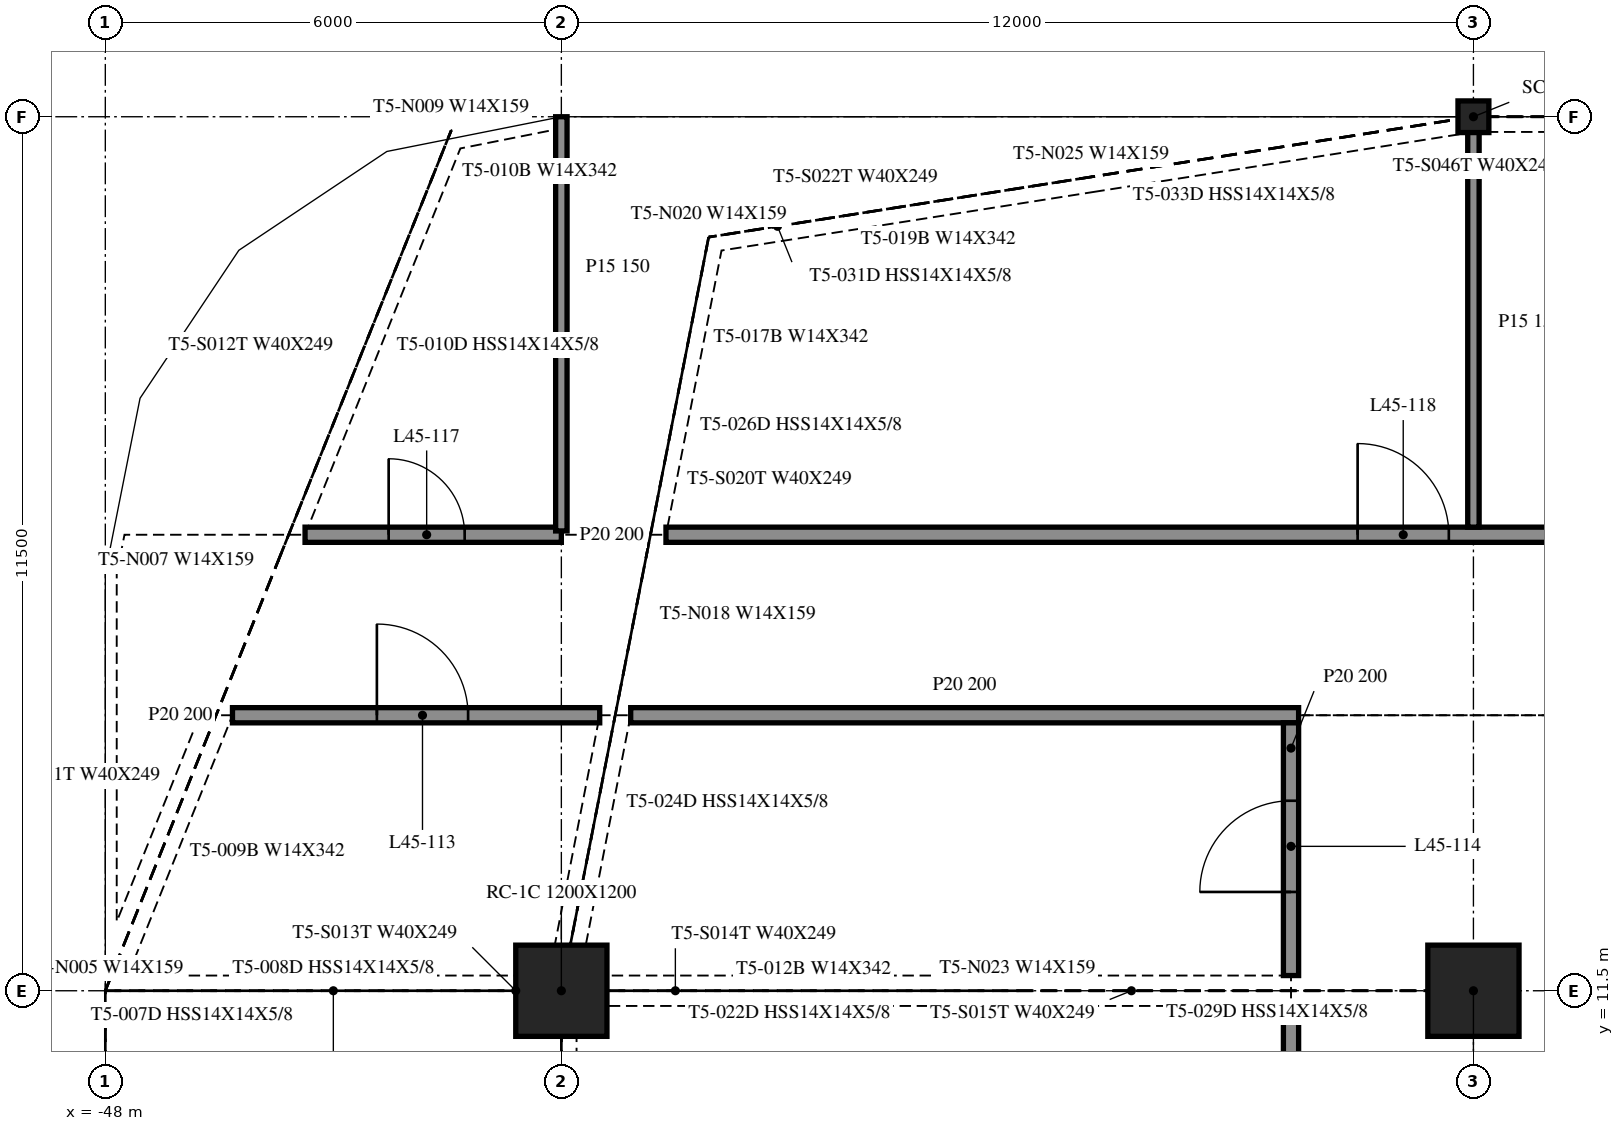
"""IFC4 building model, lengths in metres.
Left out: names, types, materials, properties, quantities, classifications, styles, units other than length and angle.
Written with IfcOpenShell. Run it as: python <this file> out.ifc"""

import sys

from ifc_helpers import new_model, si_unit, direction, frame, frame_2d, origin, origin_2d, place, context, subcontext, project, spatial, rectangle, i_section, extrude, element, fill, save


model = new_model("IFC4")
c1 = context("Model", 3, precision=1e-05, world=origin(), true_north=direction((0.0, 1.0)))
c2 = subcontext(c1, "Body", "Model", "MODEL_VIEW")
j1 = project(units=[si_unit("LENGTHUNIT", "METRE"), si_unit("PLANEANGLEUNIT", "RADIAN")], contexts=[c1])
p1 = place(None, origin())
s1 = spatial("IfcSite", under=j1, at=p1, CompositionType="ELEMENT")
p2 = place(p1, origin())
s2 = spatial("IfcBuilding", under=s1, at=p2, CompositionType="ELEMENT")
p3 = place(p2, frame((0.0, 0.0, 189.6)))
s3 = spatial("IfcBuildingStorey", under=s2, at=p3, CompositionType="ELEMENT", Elevation=189.6)
for number, where, z_axis, x_axis in (
    (1, (-42.0, 11.5, -0.4), (0.0, 0.0, 1.0), (1.0, 0.0, 0.0)),
    (2, (-30.0, 11.5, -0.4), (0.0, 0.0, 1.0), (1.0, 0.0, 0.0)),
):
    element("IfcColumn", number, at=place(p3, frame(where, z_axis=z_axis, x_axis=x_axis)), inside=s3, PredefinedType="COLUMN", context=c2, shape_type="SweptSolid", body=[
        extrude(rectangle(XDim=1.2, YDim=1.2, at=origin_2d()), origin(), (0.0, 0.0, 1.0), 4.36),
    ])
p4 = place(p3, frame((-30.0, 23.0, -0.4), z_axis=(0.0, 0.0, 1.0), x_axis=(1.0, 0.0, 0.0)))
e3 = element("IfcColumn", 3, at=p4, inside=s3, PredefinedType="COLUMN", context=c2, shape_type="SweptSolid", body=[
    extrude(i_section(OverallWidth=0.406, OverallDepth=0.417, WebThickness=0.03, FlangeThickness=0.048, at=origin_2d()), origin(), (0.0, 0.0, 1.0), 4.36),
])
p5 = place(p3, frame((-46.327, 15.125, 0.0), z_axis=(0.0, 0.0, 1.0), x_axis=(1.0, 0.0, 0.0)))
e4 = element("IfcWall", 4, at=p5, inside=s3, PredefinedType="PARTITIONING", context=c2, shape_type="SweptSolid", body=[
    extrude(rectangle(XDim=4.832, YDim=0.2, at=frame_2d((2.416, 0.0))), origin(), (0.0, 0.0, 1.0), 3.96),
])
p6 = place(p5, frame((1.9, 0.0, 0.0)))
e5 = element("IfcOpeningElement", 5, at=p6, cuts=e4, PredefinedType="OPENING", context=c2, shape_type="SweptSolid", body=[
    extrude(rectangle(XDim=1.2, YDim=2.1, at=frame_2d((0.6, 1.05))), frame((0.0, 0.11, 0.0), z_axis=(0.0, -1.0, 0.0), x_axis=(1.0, 0.0, 0.0)), (0.0, 0.0, 1.0), 0.22),
])
p7 = place(p3, frame((-41.088, 15.125, 0.0), z_axis=(0.0, 0.0, 1.0), x_axis=(1.0, 0.0, 0.0)))
e6 = element("IfcWall", 6, at=p7, inside=s3, PredefinedType="PARTITIONING", context=c2, shape_type="SweptSolid", body=[
    extrude(rectangle(XDim=8.788, YDim=0.2, at=frame_2d((4.394, 0.0))), origin(), (0.0, 0.0, 1.0), 3.96),
])
p8 = place(p3, frame((-45.372, 17.5, 0.0), z_axis=(0.0, 0.0, 1.0), x_axis=(1.0, 0.0, 0.0)))
e7 = element("IfcWall", 7, at=p8, inside=s3, PredefinedType="PARTITIONING", context=c2, shape_type="SweptSolid", body=[
    extrude(rectangle(XDim=3.372, YDim=0.2, at=frame_2d((1.686, 0.0))), origin(), (0.0, 0.0, 1.0), 3.96),
])
p9 = place(p8, frame((1.1, 0.0, 0.0)))
e8 = element("IfcOpeningElement", 8, at=p9, cuts=e7, PredefinedType="OPENING", context=c2, shape_type="SweptSolid", body=[
    extrude(rectangle(XDim=1.0, YDim=2.1, at=frame_2d((0.5, 1.05))), frame((0.0, 0.11, 0.0), z_axis=(0.0, -1.0, 0.0), x_axis=(1.0, 0.0, 0.0)), (0.0, 0.0, 1.0), 0.22),
])
p10 = place(p3, frame((-40.624, 17.5, 0.0), z_axis=(0.0, 0.0, 1.0), x_axis=(1.0, 0.0, 0.0)))
e9 = element("IfcWall", 9, at=p10, inside=s3, PredefinedType="PARTITIONING", context=c2, shape_type="SweptSolid", body=[
    extrude(rectangle(XDim=94.524, YDim=0.2, at=frame_2d((47.262, 0.0))), origin(), (0.0, 0.0, 1.0), 3.96),
])
p11 = place(p10, frame((9.1, 0.0, 0.0)))
e10 = element("IfcOpeningElement", 10, at=p11, cuts=e9, PredefinedType="OPENING", context=c2, shape_type="SweptSolid", body=[
    extrude(rectangle(XDim=1.2, YDim=2.1, at=frame_2d((0.6, 1.05))), frame((0.0, 0.11, 0.0), z_axis=(0.0, -1.0, 0.0), x_axis=(1.0, 0.0, 0.0)), (0.0, 0.0, 1.0), 0.22),
])
p12 = place(p10, frame((21.1, 0.0, 0.0)))
e11 = element("IfcOpeningElement", 11, at=p12, cuts=e9, PredefinedType="OPENING", context=c2, shape_type="SweptSolid", body=[
    extrude(rectangle(XDim=1.2, YDim=2.1, at=frame_2d((0.6, 1.05))), frame((0.0, 0.11, 0.0), z_axis=(0.0, -1.0, 0.0), x_axis=(1.0, 0.0, 0.0)), (0.0, 0.0, 1.0), 0.22),
])
p13 = place(p10, frame((33.3, 0.0, 0.0)))
e12 = element("IfcOpeningElement", 12, at=p13, cuts=e9, PredefinedType="OPENING", context=c2, shape_type="SweptSolid", body=[
    extrude(rectangle(XDim=1.0, YDim=2.1, at=frame_2d((0.5, 1.05))), frame((0.0, 0.11, 0.0), z_axis=(0.0, -1.0, 0.0), x_axis=(1.0, 0.0, 0.0)), (0.0, 0.0, 1.0), 0.22),
])
p14 = place(p10, frame((45.5, 0.0, 0.0)))
e13 = element("IfcOpeningElement", 13, at=p14, cuts=e9, PredefinedType="OPENING", context=c2, shape_type="SweptSolid", body=[
    extrude(rectangle(XDim=0.9, YDim=2.1, at=frame_2d((0.45, 1.05))), frame((0.0, 0.11, 0.0), z_axis=(0.0, -1.0, 0.0), x_axis=(1.0, 0.0, 0.0)), (0.0, 0.0, 1.0), 0.22),
])
p15 = place(p10, frame((46.9, 0.0, 0.0)))
e14 = element("IfcOpeningElement", 14, at=p15, cuts=e9, PredefinedType="OPENING", context=c2, shape_type="SweptSolid", body=[
    extrude(rectangle(XDim=1.0, YDim=2.1, at=frame_2d((0.5, 1.05))), frame((0.0, 0.11, 0.0), z_axis=(0.0, -1.0, 0.0), x_axis=(1.0, 0.0, 0.0)), (0.0, 0.0, 1.0), 0.22),
])
p16 = place(p10, frame((58.9, 0.0, 0.0)))
e15 = element("IfcOpeningElement", 15, at=p16, cuts=e9, PredefinedType="OPENING", context=c2, shape_type="SweptSolid", body=[
    extrude(rectangle(XDim=1.0, YDim=2.1, at=frame_2d((0.5, 1.05))), frame((0.0, 0.11, 0.0), z_axis=(0.0, -1.0, 0.0), x_axis=(1.0, 0.0, 0.0)), (0.0, 0.0, 1.0), 0.22),
])
p17 = place(p10, frame((70.9, 0.0, 0.0)))
e16 = element("IfcOpeningElement", 16, at=p17, cuts=e9, PredefinedType="OPENING", context=c2, shape_type="SweptSolid", body=[
    extrude(rectangle(XDim=1.2, YDim=2.1, at=frame_2d((0.6, 1.05))), frame((0.0, 0.11, 0.0), z_axis=(0.0, -1.0, 0.0), x_axis=(1.0, 0.0, 0.0)), (0.0, 0.0, 1.0), 0.22),
])
p18 = place(p10, frame((82.9, 0.0, 0.0)))
e17 = element("IfcOpeningElement", 17, at=p18, cuts=e9, PredefinedType="OPENING", context=c2, shape_type="SweptSolid", body=[
    extrude(rectangle(XDim=1.2, YDim=2.1, at=frame_2d((0.6, 1.05))), frame((0.0, 0.11, 0.0), z_axis=(0.0, -1.0, 0.0), x_axis=(1.0, 0.0, 0.0)), (0.0, 0.0, 1.0), 0.22),
])
p19 = place(p3, frame((-42.0, 17.55, 0.0), z_axis=(0.0, 0.0, 1.0), x_axis=(0.0, 1.0, 0.0)))
e18 = element("IfcWall", 18, at=p19, inside=s3, PredefinedType="PARTITIONING", context=c2, shape_type="SweptSolid", body=[
    extrude(rectangle(XDim=5.45, YDim=0.15, at=frame_2d((2.725, 0.0))), origin(), (0.0, 0.0, 1.0), 3.96),
])
p20 = place(p3, frame((-32.4, 0.2, 0.0), z_axis=(0.0, 0.0, 1.0), x_axis=(0.0, 1.0, 0.0)))
e19 = element("IfcWall", 19, at=p20, inside=s3, PredefinedType="PARTITIONING", context=c2, shape_type="SweptSolid", body=[
    extrude(rectangle(XDim=11.1, YDim=0.2, at=frame_2d((5.55, 0.0))), origin(), (0.0, 0.0, 1.0), 3.96),
])
p21 = place(p20, frame((5.1, 0.0, 0.0)))
e20 = element("IfcOpeningElement", 20, at=p21, cuts=e19, PredefinedType="OPENING", context=c2, shape_type="SweptSolid", body=[
    extrude(rectangle(XDim=1.0, YDim=2.1, at=frame_2d((0.5, 1.05))), frame((0.0, 0.11, 0.0), z_axis=(0.0, -1.0, 0.0), x_axis=(1.0, 0.0, 0.0)), (0.0, 0.0, 1.0), 0.22),
])
p22 = place(p3, frame((-32.4, 11.7, 0.0), z_axis=(0.0, 0.0, 1.0), x_axis=(0.0, 1.0, 0.0)))
e21 = element("IfcWall", 21, at=p22, inside=s3, PredefinedType="PARTITIONING", context=c2, shape_type="SweptSolid", body=[
    extrude(rectangle(XDim=3.325, YDim=0.2, at=frame_2d((1.663, 0.0))), origin(), (0.0, 0.0, 1.0), 3.96),
])
p23 = place(p22, frame((1.1, 0.0, 0.0)))
e22 = element("IfcOpeningElement", 22, at=p23, cuts=e21, PredefinedType="OPENING", context=c2, shape_type="SweptSolid", body=[
    extrude(rectangle(XDim=1.2, YDim=2.1, at=frame_2d((0.6, 1.05))), frame((0.0, 0.11, 0.0), z_axis=(0.0, -1.0, 0.0), x_axis=(1.0, 0.0, 0.0)), (0.0, 0.0, 1.0), 0.22),
])
p24 = place(p3, frame((-30.0, 17.6, 0.0), z_axis=(0.0, 0.0, 1.0), x_axis=(0.0, 1.0, 0.0)))
e23 = element("IfcWall", 23, at=p24, inside=s3, PredefinedType="PARTITIONING", context=c2, shape_type="SweptSolid", body=[
    extrude(rectangle(XDim=5.4, YDim=0.15, at=frame_2d((2.7, 0.0))), origin(), (0.0, 0.0, 1.0), 3.96),
])
p25 = place(p6, origin())
e24 = element("IfcDoor", 24, at=p25, inside=s3, OperationType="SINGLE_SWING_LEFT", PredefinedType="DOOR", context=c2, shape_type="SweptSolid", body=[
    extrude(rectangle(XDim=1.2, YDim=2.1, at=frame_2d((0.6, 1.05))), frame((0.0, 0.025, 0.0), z_axis=(0.0, -1.0, 0.0), x_axis=(1.0, 0.0, 0.0)), (0.0, 0.0, 1.0), 0.05),
])
fill(e5, e24)
p26 = place(p23, origin())
e25 = element("IfcDoor", 25, at=p26, inside=s3, OperationType="SINGLE_SWING_RIGHT", PredefinedType="DOOR", context=c2, shape_type="SweptSolid", body=[
    extrude(rectangle(XDim=1.2, YDim=2.1, at=frame_2d((0.6, 1.05))), frame((0.0, 0.025, 0.0), z_axis=(0.0, -1.0, 0.0), x_axis=(1.0, 0.0, 0.0)), (0.0, 0.0, 1.0), 0.05),
])
fill(e22, e25)
p27 = place(p9, origin())
e26 = element("IfcDoor", 26, at=p27, inside=s3, OperationType="SINGLE_SWING_LEFT", PredefinedType="DOOR", context=c2, shape_type="SweptSolid", body=[
    extrude(rectangle(XDim=1.0, YDim=2.1, at=frame_2d((0.5, 1.05))), frame((0.0, 0.025, 0.0), z_axis=(0.0, -1.0, 0.0), x_axis=(1.0, 0.0, 0.0)), (0.0, 0.0, 1.0), 0.05),
])
fill(e8, e26)
p28 = place(p11, origin())
e27 = element("IfcDoor", 27, at=p28, inside=s3, OperationType="SINGLE_SWING_LEFT", PredefinedType="DOOR", context=c2, shape_type="SweptSolid", body=[
    extrude(rectangle(XDim=1.2, YDim=2.1, at=frame_2d((0.6, 1.05))), frame((0.0, 0.025, 0.0), z_axis=(0.0, -1.0, 0.0), x_axis=(1.0, 0.0, 0.0)), (0.0, 0.0, 1.0), 0.05),
])
fill(e10, e27)
save(model, sys.argv[1])
